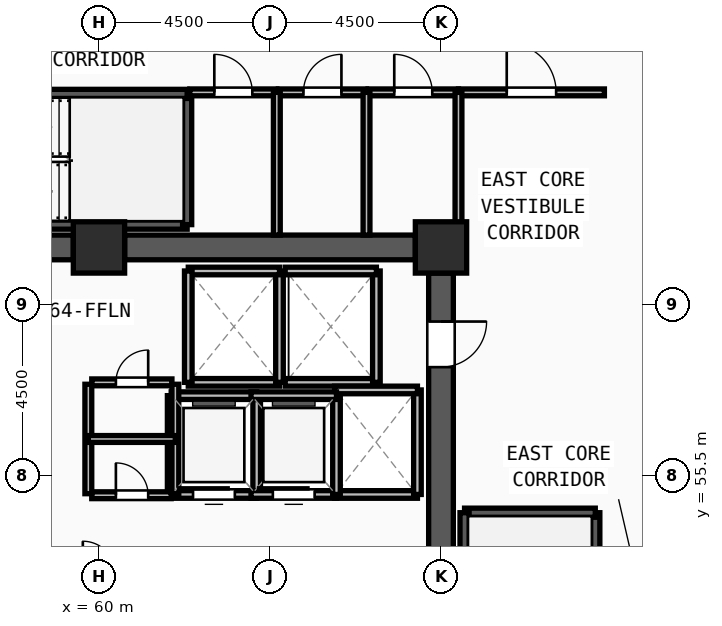
"""IFC4 building model, lengths in metres.
Left out: names, types, materials, properties, quantities, classifications, styles, units other than length and angle.
Written with IfcOpenShell. Run it as: python <this file> out.ifc"""

import sys

from ifc_helpers import new_model, si_unit, direction, frame, frame_2d, origin, origin_2d, place, context, subcontext, project, spatial, rectangle, extrude, source, transform, mapped, element, fill, save


model = new_model("IFC4")
c1 = context("Model", 3, precision=1e-05, world=origin(), true_north=direction((0.0, 1.0)))
c2 = subcontext(c1, "Body", "Model", "MODEL_VIEW")
j1 = project(units=[si_unit("LENGTHUNIT", "METRE"), si_unit("PLANEANGLEUNIT", "RADIAN")], contexts=[c1])
p1 = place(None, origin())
s1 = spatial("IfcSite", under=j1, at=p1, CompositionType="ELEMENT")
p2 = place(p1, origin())
s2 = spatial("IfcBuilding", under=s1, at=p2, CompositionType="ELEMENT")
p3 = place(p2, frame((0.0, 0.0, 247.5)))
s3 = spatial("IfcBuildingStorey", under=s2, at=p3, CompositionType="ELEMENT", Elevation=247.5)
m1 = source(origin(), c2, "Body", "SweptSolid", [
    extrude(rectangle(XDim=1.35, YDim=1.35, at=origin_2d()), origin(), (0.0, 0.0, 1.0), 3.75),
])
for number, where, z_axis, x_axis in (
    (1, (69.0, 61.5, 0.0), (0.0, 0.0, 1.0), (1.0, 0.0, 0.0)),
    (2, (60.0, 61.5, 0.0), (0.0, 0.0, 1.0), (1.0, 0.0, 0.0)),
):
    element("IfcColumn", number, at=place(p3, frame(where, z_axis=z_axis, x_axis=x_axis)), inside=s3, PredefinedType="COLUMN", context=c2, shape_type="MappedRepresentation", body=[
        mapped(m1, transform((0.0, 0.0, 0.0), x_axis=(1.0, 0.0, 0.0), y_axis=(0.0, 1.0, 0.0), z_axis=(0.0, 0.0, 1.0), scale=1.0)),
    ])
for number, where, z_axis, x_axis in (
    (3, (51.675, 61.5, 0.0), (0.0, 0.0, 1.0), (1.0, 0.0, 0.0)),
    (4, (60.675, 61.5, 0.0), (0.0, 0.0, 1.0), (1.0, 0.0, 0.0)),
):
    element("IfcWall", number, at=place(p3, frame(where, z_axis=z_axis, x_axis=x_axis)), inside=s3, PredefinedType="SHEAR", context=c2, shape_type="SweptSolid", body=[
        extrude(rectangle(XDim=7.65, YDim=0.65, at=frame_2d((3.825, 0.0))), origin(), (0.0, 0.0, 1.0), 3.57),
    ])
p4 = place(p3, frame((69.0, 60.825, 0.0), z_axis=(0.0, 0.0, 1.0), x_axis=(0.0, -1.0, 0.0)))
e5 = element("IfcWall", 5, at=p4, inside=s3, PredefinedType="SHEAR", context=c2, shape_type="SweptSolid", body=[
    extrude(rectangle(XDim=13.65, YDim=0.65, at=frame_2d((6.825, 0.0))), origin(), (0.0, 0.0, 1.0), 3.57),
])
m2 = source(origin(), c2, "Body", "SweptSolid", [
    extrude(rectangle(XDim=1.2, YDim=2.2, at=frame_2d((0.6, 1.1))), frame((0.0, 0.335, 0.0), z_axis=(0.0, -1.0, 0.0), x_axis=(1.0, 0.0, 0.0)), (0.0, 0.0, 1.0), 0.67),
])
p5 = place(p4, frame((1.275, 0.0, 0.0)))
e6 = element("IfcOpeningElement", 6, at=p5, cuts=e5, PredefinedType="OPENING", context=c2, shape_type="MappedRepresentation", body=[
    mapped(m2, transform((0.0, 0.0, 0.0), x_axis=(1.0, 0.0, 0.0), y_axis=(0.0, 1.0, 0.0), z_axis=(0.0, 0.0, 1.0), scale=1.0)),
])
p6 = place(p3, frame((73.06, 46.7, 0.0), z_axis=(0.0, 0.0, 1.0), x_axis=(0.0, 1.0, 0.0)))
e7 = element("IfcWall", 7, at=p6, inside=s3, PredefinedType="SOLIDWALL", context=c2, shape_type="SweptSolid", body=[
    extrude(rectangle(XDim=7.82, YDim=0.24, at=frame_2d((3.91, 0.0))), origin(), (0.0, 0.0, 1.0), 3.57),
])
m3 = source(origin(), c2, "Body", "SweptSolid", [
    extrude(rectangle(XDim=1.2, YDim=2.2, at=frame_2d((0.6, 1.1))), frame((0.0, 0.13, 0.0), z_axis=(0.0, -1.0, 0.0), x_axis=(1.0, 0.0, 0.0)), (0.0, 0.0, 1.0), 0.26),
])
p7 = place(p6, frame((0.32, 0.0, 0.0)))
e8 = element("IfcOpeningElement", 8, at=p7, cuts=e7, PredefinedType="OPENING", context=c2, shape_type="MappedRepresentation", body=[
    mapped(m3, transform((0.0, 0.0, 0.0), x_axis=(1.0, 0.0, 0.0), y_axis=(0.0, 1.0, 0.0), z_axis=(0.0, 0.0, 1.0), scale=1.0)),
])
p8 = place(p3, frame((73.06, 54.52, 0.0), z_axis=(0.0, 0.0, 1.0), x_axis=(-1.0, 0.0, 0.0)))
e9 = element("IfcWall", 9, at=p8, inside=s3, PredefinedType="SOLIDWALL", context=c2, shape_type="SweptSolid", body=[
    extrude(rectangle(XDim=3.44, YDim=0.24, at=frame_2d((1.72, 0.0))), origin(), (0.0, 0.0, 1.0), 3.57),
])
for number, where, z_axis, x_axis in (
    (10, (69.62, 54.52, 0.0), (0.0, 0.0, 1.0), (0.0, -1.0, 0.0)),
    (11, (54.5, 62.1, 0.0), (0.0, 0.0, 1.0), (1.0, 0.0, 0.0)),
):
    element("IfcWall", number, at=place(p3, frame(where, z_axis=z_axis, x_axis=x_axis)), inside=s3, PredefinedType="SOLIDWALL", context=c2, shape_type="SweptSolid", body=[
        extrude(rectangle(XDim=7.82, YDim=0.24, at=frame_2d((3.91, 0.0))), origin(), (0.0, 0.0, 1.0), 3.57),
    ])
p9 = place(p3, frame((62.32, 62.1, 0.0), z_axis=(0.0, 0.0, 1.0), x_axis=(0.0, 1.0, 0.0)))
e12 = element("IfcWall", 12, at=p9, inside=s3, PredefinedType="SOLIDWALL", context=c2, shape_type="SweptSolid", body=[
    extrude(rectangle(XDim=3.44, YDim=0.24, at=frame_2d((1.72, 0.0))), origin(), (0.0, 0.0, 1.0), 3.57),
])
p10 = place(p3, frame((62.32, 65.54, 0.0), z_axis=(0.0, 0.0, 1.0), x_axis=(-1.0, 0.0, 0.0)))
e13 = element("IfcWall", 13, at=p10, inside=s3, PredefinedType="SOLIDWALL", context=c2, shape_type="SweptSolid", body=[
    extrude(rectangle(XDim=7.82, YDim=0.24, at=frame_2d((3.91, 0.0))), origin(), (0.0, 0.0, 1.0), 3.57),
])
p11 = place(p10, frame((6.3, 0.0, 0.0)))
e14 = element("IfcOpeningElement", 14, at=p11, cuts=e13, PredefinedType="OPENING", context=c2, shape_type="MappedRepresentation", body=[
    mapped(m3, transform((0.0, 0.0, 0.0), x_axis=(1.0, 0.0, 0.0), y_axis=(0.0, 1.0, 0.0), z_axis=(0.0, 0.0, 1.0), scale=1.0)),
])
p12 = place(p3, frame((62.35, 57.95, 0.0), z_axis=(0.0, 0.0, 1.0), x_axis=(1.0, 0.0, 0.0)))
e15 = element("IfcWall", 15, at=p12, inside=s3, PredefinedType="SOLIDWALL", context=c2, shape_type="SweptSolid", body=[
    extrude(rectangle(XDim=2.4, YDim=0.2, at=frame_2d((1.2, 0.0))), origin(), (0.0, 0.0, 1.0), 3.57),
])
p13 = place(p3, frame((64.75, 57.95, 0.0), z_axis=(0.0, 0.0, 1.0), x_axis=(0.0, 1.0, 0.0)))
e16 = element("IfcWall", 16, at=p13, inside=s3, PredefinedType="SOLIDWALL", context=c2, shape_type="SweptSolid", body=[
    extrude(rectangle(XDim=2.93, YDim=0.2, at=frame_2d((1.465, 0.0))), origin(), (0.0, 0.0, 1.0), 3.57),
])
p14 = place(p3, frame((64.75, 60.88, 0.0), z_axis=(0.0, 0.0, 1.0), x_axis=(-1.0, 0.0, 0.0)))
e17 = element("IfcWall", 17, at=p14, inside=s3, PredefinedType="SOLIDWALL", context=c2, shape_type="SweptSolid", body=[
    extrude(rectangle(XDim=2.4, YDim=0.2, at=frame_2d((1.2, 0.0))), origin(), (0.0, 0.0, 1.0), 3.57),
])
p15 = place(p3, frame((62.35, 60.88, 0.0), z_axis=(0.0, 0.0, 1.0), x_axis=(0.0, -1.0, 0.0)))
e18 = element("IfcWall", 18, at=p15, inside=s3, PredefinedType="SOLIDWALL", context=c2, shape_type="SweptSolid", body=[
    extrude(rectangle(XDim=2.93, YDim=0.2, at=frame_2d((1.465, 0.0))), origin(), (0.0, 0.0, 1.0), 3.57),
])
p16 = place(p3, frame((64.9, 57.95, 0.0), z_axis=(0.0, 0.0, 1.0), x_axis=(1.0, 0.0, 0.0)))
e19 = element("IfcWall", 19, at=p16, inside=s3, PredefinedType="SOLIDWALL", context=c2, shape_type="SweptSolid", body=[
    extrude(rectangle(XDim=2.4, YDim=0.2, at=frame_2d((1.2, 0.0))), origin(), (0.0, 0.0, 1.0), 3.57),
])
p17 = place(p3, frame((67.3, 57.95, 0.0), z_axis=(0.0, 0.0, 1.0), x_axis=(0.0, 1.0, 0.0)))
e20 = element("IfcWall", 20, at=p17, inside=s3, PredefinedType="SOLIDWALL", context=c2, shape_type="SweptSolid", body=[
    extrude(rectangle(XDim=2.93, YDim=0.2, at=frame_2d((1.465, 0.0))), origin(), (0.0, 0.0, 1.0), 3.57),
])
p18 = place(p3, frame((67.3, 60.88, 0.0), z_axis=(0.0, 0.0, 1.0), x_axis=(-1.0, 0.0, 0.0)))
e21 = element("IfcWall", 21, at=p18, inside=s3, PredefinedType="SOLIDWALL", context=c2, shape_type="SweptSolid", body=[
    extrude(rectangle(XDim=2.4, YDim=0.2, at=frame_2d((1.2, 0.0))), origin(), (0.0, 0.0, 1.0), 3.57),
])
p19 = place(p3, frame((66.2, 55.0, 0.0), z_axis=(0.0, 0.0, 1.0), x_axis=(1.0, 0.0, 0.0)))
e22 = element("IfcWall", 22, at=p19, inside=s3, PredefinedType="SOLIDWALL", context=c2, shape_type="SweptSolid", body=[
    extrude(rectangle(XDim=2.18, YDim=0.2, at=frame_2d((1.09, 0.0))), origin(), (0.0, 0.0, 1.0), 3.57),
])
p20 = place(p3, frame((68.38, 55.0, 0.0), z_axis=(0.0, 0.0, 1.0), x_axis=(0.0, 1.0, 0.0)))
e23 = element("IfcWall", 23, at=p20, inside=s3, PredefinedType="SOLIDWALL", context=c2, shape_type="SweptSolid", body=[
    extrude(rectangle(XDim=2.75, YDim=0.2, at=frame_2d((1.375, 0.0))), origin(), (0.0, 0.0, 1.0), 3.57),
])
p21 = place(p3, frame((68.38, 57.75, 0.0), z_axis=(0.0, 0.0, 1.0), x_axis=(-1.0, 0.0, 0.0)))
e24 = element("IfcWall", 24, at=p21, inside=s3, PredefinedType="SOLIDWALL", context=c2, shape_type="SweptSolid", body=[
    extrude(rectangle(XDim=2.18, YDim=0.2, at=frame_2d((1.09, 0.0))), origin(), (0.0, 0.0, 1.0), 3.57),
])
p22 = place(p3, frame((61.9, 55.0, 0.0), z_axis=(0.0, 0.0, 1.0), x_axis=(1.0, 0.0, 0.0)))
e25 = element("IfcWall", 25, at=p22, inside=s3, PredefinedType="SOLIDWALL", context=c2, shape_type="SweptSolid", body=[
    extrude(rectangle(XDim=2.25, YDim=0.2, at=frame_2d((1.125, 0.0))), origin(), (0.0, 0.0, 1.0), 3.57),
])
m4 = source(origin(), c2, "Body", "SweptSolid", [
    extrude(rectangle(XDim=1.1, YDim=2.2, at=frame_2d((0.55, 1.1))), frame((0.0, 0.11, 0.0), z_axis=(0.0, -1.0, 0.0), x_axis=(1.0, 0.0, 0.0)), (0.0, 0.0, 1.0), 0.22),
])
p23 = place(p22, frame((0.575, 0.0, 0.0)))
e26 = element("IfcOpeningElement", 26, at=p23, cuts=e25, PredefinedType="OPENING", context=c2, shape_type="MappedRepresentation", body=[
    mapped(m4, transform((0.0, 0.0, 0.0), x_axis=(1.0, 0.0, 0.0), y_axis=(0.0, 1.0, 0.0), z_axis=(0.0, 0.0, 1.0), scale=1.0)),
])
p24 = place(p3, frame((64.15, 55.0, 0.0), z_axis=(0.0, 0.0, 1.0), x_axis=(0.0, 1.0, 0.0)))
e27 = element("IfcWall", 27, at=p24, inside=s3, PredefinedType="SOLIDWALL", context=c2, shape_type="SweptSolid", body=[
    extrude(rectangle(XDim=2.6, YDim=0.2, at=frame_2d((1.3, 0.0))), origin(), (0.0, 0.0, 1.0), 3.57),
])
p25 = place(p3, frame((64.15, 57.6, 0.0), z_axis=(0.0, 0.0, 1.0), x_axis=(-1.0, 0.0, 0.0)))
e28 = element("IfcWall", 28, at=p25, inside=s3, PredefinedType="SOLIDWALL", context=c2, shape_type="SweptSolid", body=[
    extrude(rectangle(XDim=2.25, YDim=0.2, at=frame_2d((1.125, 0.0))), origin(), (0.0, 0.0, 1.0), 3.57),
])
p26 = place(p3, frame((61.9, 57.6, 0.0), z_axis=(0.0, 0.0, 1.0), x_axis=(0.0, -1.0, 0.0)))
e29 = element("IfcWall", 29, at=p26, inside=s3, PredefinedType="SOLIDWALL", context=c2, shape_type="SweptSolid", body=[
    extrude(rectangle(XDim=2.6, YDim=0.2, at=frame_2d((1.3, 0.0))), origin(), (0.0, 0.0, 1.0), 3.57),
])
p27 = place(p3, frame((64.0, 55.0, 0.0), z_axis=(0.0, 0.0, 1.0), x_axis=(1.0, 0.0, 0.0)))
e30 = element("IfcWall", 30, at=p27, inside=s3, PredefinedType="SOLIDWALL", context=c2, shape_type="SweptSolid", body=[
    extrude(rectangle(XDim=2.25, YDim=0.2, at=frame_2d((1.125, 0.0))), origin(), (0.0, 0.0, 1.0), 3.57),
])
p28 = place(p27, frame((0.575, 0.0, 0.0)))
e31 = element("IfcOpeningElement", 31, at=p28, cuts=e30, PredefinedType="OPENING", context=c2, shape_type="MappedRepresentation", body=[
    mapped(m4, transform((0.0, 0.0, 0.0), x_axis=(1.0, 0.0, 0.0), y_axis=(0.0, 1.0, 0.0), z_axis=(0.0, 0.0, 1.0), scale=1.0)),
])
p29 = place(p3, frame((66.25, 55.0, 0.0), z_axis=(0.0, 0.0, 1.0), x_axis=(0.0, 1.0, 0.0)))
e32 = element("IfcWall", 32, at=p29, inside=s3, PredefinedType="SOLIDWALL", context=c2, shape_type="SweptSolid", body=[
    extrude(rectangle(XDim=2.6, YDim=0.2, at=frame_2d((1.3, 0.0))), origin(), (0.0, 0.0, 1.0), 3.57),
])
p30 = place(p3, frame((66.25, 57.6, 0.0), z_axis=(0.0, 0.0, 1.0), x_axis=(-1.0, 0.0, 0.0)))
e33 = element("IfcWall", 33, at=p30, inside=s3, PredefinedType="SOLIDWALL", context=c2, shape_type="SweptSolid", body=[
    extrude(rectangle(XDim=2.25, YDim=0.2, at=frame_2d((1.125, 0.0))), origin(), (0.0, 0.0, 1.0), 3.57),
])
p31 = place(p3, frame((59.81, 54.98, 0.0), z_axis=(0.0, 0.0, 1.0), x_axis=(1.0, 0.0, 0.0)))
e34 = element("IfcWall", 34, at=p31, inside=s3, PredefinedType="PARTITIONING", context=c2, shape_type="SweptSolid", body=[
    extrude(rectangle(XDim=2.09, YDim=0.18, at=frame_2d((1.045, 0.0))), origin(), (0.0, 0.0, 1.0), 3.57),
])
m5 = source(origin(), c2, "Body", "SweptSolid", [
    extrude(rectangle(XDim=0.85, YDim=2.1, at=frame_2d((0.425, 1.05))), frame((0.0, 0.1, 0.0), z_axis=(0.0, -1.0, 0.0), x_axis=(1.0, 0.0, 0.0)), (0.0, 0.0, 1.0), 0.2),
])
p32 = place(p31, frame((0.635, 0.0, 0.0)))
e35 = element("IfcOpeningElement", 35, at=p32, cuts=e34, PredefinedType="OPENING", context=c2, shape_type="MappedRepresentation", body=[
    mapped(m5, transform((0.0, 0.0, 0.0), x_axis=(1.0, 0.0, 0.0), y_axis=(0.0, 1.0, 0.0), z_axis=(0.0, 0.0, 1.0), scale=1.0)),
])
p33 = place(p3, frame((59.81, 57.95, 0.0), z_axis=(0.0, 0.0, 1.0), x_axis=(1.0, 0.0, 0.0)))
e36 = element("IfcWall", 36, at=p33, inside=s3, PredefinedType="PARTITIONING", context=c2, shape_type="SweptSolid", body=[
    extrude(rectangle(XDim=2.11, YDim=0.18, at=frame_2d((1.055, 0.0))), origin(), (0.0, 0.0, 1.0), 3.57),
])
p34 = place(p33, frame((0.635, 0.0, 0.0)))
e37 = element("IfcOpeningElement", 37, at=p34, cuts=e36, PredefinedType="OPENING", context=c2, shape_type="MappedRepresentation", body=[
    mapped(m5, transform((0.0, 0.0, 0.0), x_axis=(1.0, 0.0, 0.0), y_axis=(0.0, 1.0, 0.0), z_axis=(0.0, 0.0, 1.0), scale=1.0)),
])
p35 = place(p3, frame((62.39, 65.58, 0.0), z_axis=(0.0, 0.0, 1.0), x_axis=(1.0, 0.0, 0.0)))
e38 = element("IfcWall", 38, at=p35, inside=s3, PredefinedType="PARTITIONING", context=c2, shape_type="SweptSolid", body=[
    extrude(rectangle(XDim=2.29, YDim=0.18, at=frame_2d((1.145, 0.0))), origin(), (0.0, 0.0, 1.0), 3.57),
])
m6 = source(origin(), c2, "Body", "SweptSolid", [
    extrude(rectangle(XDim=1.0, YDim=2.2, at=frame_2d((0.5, 1.1))), frame((0.0, 0.1, 0.0), z_axis=(0.0, -1.0, 0.0), x_axis=(1.0, 0.0, 0.0)), (0.0, 0.0, 1.0), 0.2),
])
p36 = place(p35, frame((0.645, 0.0, 0.0)))
e39 = element("IfcOpeningElement", 39, at=p36, cuts=e38, PredefinedType="OPENING", context=c2, shape_type="MappedRepresentation", body=[
    mapped(m6, transform((0.0, 0.0, 0.0), x_axis=(1.0, 0.0, 0.0), y_axis=(0.0, 1.0, 0.0), z_axis=(0.0, 0.0, 1.0), scale=1.0)),
])
p37 = place(p3, frame((64.72, 65.58, 0.0), z_axis=(0.0, 0.0, 1.0), x_axis=(1.0, 0.0, 0.0)))
e40 = element("IfcWall", 40, at=p37, inside=s3, PredefinedType="PARTITIONING", context=c2, shape_type="SweptSolid", body=[
    extrude(rectangle(XDim=2.32, YDim=0.18, at=frame_2d((1.16, 0.0))), origin(), (0.0, 0.0, 1.0), 3.57),
])
p38 = place(p37, frame((0.66, 0.0, 0.0)))
e41 = element("IfcOpeningElement", 41, at=p38, cuts=e40, PredefinedType="OPENING", context=c2, shape_type="MappedRepresentation", body=[
    mapped(m6, transform((0.0, 0.0, 0.0), x_axis=(1.0, 0.0, 0.0), y_axis=(0.0, 1.0, 0.0), z_axis=(0.0, 0.0, 1.0), scale=1.0)),
])
p39 = place(p3, frame((67.08, 65.58, 0.0), z_axis=(0.0, 0.0, 1.0), x_axis=(1.0, 0.0, 0.0)))
e42 = element("IfcWall", 42, at=p39, inside=s3, PredefinedType="PARTITIONING", context=c2, shape_type="SweptSolid", body=[
    extrude(rectangle(XDim=2.38, YDim=0.18, at=frame_2d((1.19, 0.0))), origin(), (0.0, 0.0, 1.0), 3.57),
])
p40 = place(p39, frame((0.69, 0.0, 0.0)))
e43 = element("IfcOpeningElement", 43, at=p40, cuts=e42, PredefinedType="OPENING", context=c2, shape_type="MappedRepresentation", body=[
    mapped(m6, transform((0.0, 0.0, 0.0), x_axis=(1.0, 0.0, 0.0), y_axis=(0.0, 1.0, 0.0), z_axis=(0.0, 0.0, 1.0), scale=1.0)),
])
p41 = place(p3, frame((69.46, 65.58, 0.0), z_axis=(0.0, 0.0, 1.0), x_axis=(1.0, 0.0, 0.0)))
e44 = element("IfcWall", 44, at=p41, inside=s3, PredefinedType="PARTITIONING", context=c2, shape_type="SweptSolid", body=[
    extrude(rectangle(XDim=3.84, YDim=0.18, at=frame_2d((1.92, 0.0))), origin(), (0.0, 0.0, 1.0), 3.57),
])
m7 = source(origin(), c2, "Body", "SweptSolid", [
    extrude(rectangle(XDim=1.3, YDim=2.2, at=frame_2d((0.65, 1.1))), frame((0.0, 0.1, 0.0), z_axis=(0.0, -1.0, 0.0), x_axis=(1.0, 0.0, 0.0)), (0.0, 0.0, 1.0), 0.2),
])
p42 = place(p41, frame((1.27, 0.0, 0.0)))
e45 = element("IfcOpeningElement", 45, at=p42, cuts=e44, PredefinedType="OPENING", context=c2, shape_type="MappedRepresentation", body=[
    mapped(m7, transform((0.0, 0.0, 0.0), x_axis=(1.0, 0.0, 0.0), y_axis=(0.0, 1.0, 0.0), z_axis=(0.0, 0.0, 1.0), scale=1.0)),
])
for number, where, z_axis, x_axis in (
    (46, (59.72, 55.02, 0.0), (0.0, 0.0, 1.0), (0.0, 1.0, 0.0)),
    (47, (62.01, 55.02, 0.0), (0.0, 0.0, 1.0), (0.0, 1.0, 0.0)),
):
    element("IfcWall", number, at=place(p3, frame(where, z_axis=z_axis, x_axis=x_axis)), inside=s3, PredefinedType="PARTITIONING", context=c2, shape_type="SweptSolid", body=[
        extrude(rectangle(XDim=2.88, YDim=0.18, at=frame_2d((1.44, 0.0))), origin(), (0.0, 0.0, 1.0), 3.57),
    ])
p43 = place(p3, frame((59.72, 56.46, 0.0), z_axis=(0.0, 0.0, 1.0), x_axis=(1.0, 0.0, 0.0)))
e48 = element("IfcWall", 48, at=p43, inside=s3, PredefinedType="PARTITIONING", context=c2, shape_type="SweptSolid", body=[
    extrude(rectangle(XDim=2.29, YDim=0.18, at=frame_2d((1.145, 0.0))), origin(), (0.0, 0.0, 1.0), 3.57),
])
for number, where, z_axis, x_axis in (
    (49, (64.68, 61.825, 0.0), (0.0, 0.0, 1.0), (0.0, 1.0, 0.0)),
    (50, (67.04, 61.825, 0.0), (0.0, 0.0, 1.0), (0.0, 1.0, 0.0)),
):
    element("IfcWall", number, at=place(p3, frame(where, z_axis=z_axis, x_axis=x_axis)), inside=s3, PredefinedType="PARTITIONING", context=c2, shape_type="SweptSolid", body=[
        extrude(rectangle(XDim=3.755, YDim=0.18, at=frame_2d((1.877, 0.0))), origin(), (0.0, 0.0, 1.0), 3.57),
    ])
p44 = place(p3, frame((69.46, 61.95, 0.0), z_axis=(0.0, 0.0, 1.0), x_axis=(0.0, 1.0, 0.0)))
e51 = element("IfcWall", 51, at=p44, inside=s3, PredefinedType="PARTITIONING", context=c2, shape_type="SweptSolid", body=[
    extrude(rectangle(XDim=3.63, YDim=0.18, at=frame_2d((1.815, 0.0))), origin(), (0.0, 0.0, 1.0), 3.57),
])
m8 = source(origin(), c2, "Body", "SweptSolid", [
    extrude(rectangle(XDim=1.2, YDim=2.2, at=frame_2d((0.6, 1.1))), frame((0.0, 0.025, 0.0), z_axis=(0.0, -1.0, 0.0), x_axis=(1.0, 0.0, 0.0)), (0.0, 0.0, 1.0), 0.05),
])
p45 = place(p5, origin())
e52 = element("IfcDoor", 52, at=p45, inside=s3, OperationType="SINGLE_SWING_LEFT", PredefinedType="DOOR", context=c2, shape_type="MappedRepresentation", body=[
    mapped(m8, transform((0.0, 0.0, 0.0), x_axis=(1.0, 0.0, 0.0), y_axis=(0.0, 1.0, 0.0), z_axis=(0.0, 0.0, 1.0), scale=1.0)),
])
fill(e6, e52)
m9 = source(origin(), c2, "Body", "SweptSolid", [
    extrude(rectangle(XDim=1.1, YDim=2.2, at=frame_2d((0.55, 1.1))), frame((0.0, 0.025, 0.0), z_axis=(0.0, -1.0, 0.0), x_axis=(1.0, 0.0, 0.0)), (0.0, 0.0, 1.0), 0.05),
])
p46 = place(p23, origin())
e53 = element("IfcDoor", 53, at=p46, inside=s3, OperationType="SLIDING_TO_LEFT", PredefinedType="DOOR", context=c2, shape_type="MappedRepresentation", body=[
    mapped(m9, transform((0.0, 0.0, 0.0), x_axis=(1.0, 0.0, 0.0), y_axis=(0.0, 1.0, 0.0), z_axis=(0.0, 0.0, 1.0), scale=1.0)),
])
fill(e26, e53)
p47 = place(p28, origin())
e54 = element("IfcDoor", 54, at=p47, inside=s3, OperationType="SLIDING_TO_LEFT", PredefinedType="DOOR", context=c2, shape_type="MappedRepresentation", body=[
    mapped(m9, transform((0.0, 0.0, 0.0), x_axis=(1.0, 0.0, 0.0), y_axis=(0.0, 1.0, 0.0), z_axis=(0.0, 0.0, 1.0), scale=1.0)),
])
fill(e31, e54)
m10 = source(origin(), c2, "Body", "SweptSolid", [
    extrude(rectangle(XDim=0.85, YDim=2.1, at=frame_2d((0.425, 1.05))), frame((0.0, 0.025, 0.0), z_axis=(0.0, -1.0, 0.0), x_axis=(1.0, 0.0, 0.0)), (0.0, 0.0, 1.0), 0.05),
])
p48 = place(p32, origin())
e55 = element("IfcDoor", 55, at=p48, inside=s3, OperationType="SINGLE_SWING_LEFT", PredefinedType="DOOR", context=c2, shape_type="MappedRepresentation", body=[
    mapped(m10, transform((0.0, 0.0, 0.0), x_axis=(1.0, 0.0, 0.0), y_axis=(0.0, 1.0, 0.0), z_axis=(0.0, 0.0, 1.0), scale=1.0)),
])
fill(e35, e55)
p49 = place(p34, origin())
e56 = element("IfcDoor", 56, at=p49, inside=s3, OperationType="SINGLE_SWING_RIGHT", PredefinedType="DOOR", context=c2, shape_type="MappedRepresentation", body=[
    mapped(m10, transform((0.0, 0.0, 0.0), x_axis=(1.0, 0.0, 0.0), y_axis=(0.0, 1.0, 0.0), z_axis=(0.0, 0.0, 1.0), scale=1.0)),
])
fill(e37, e56)
m11 = source(origin(), c2, "Body", "SweptSolid", [
    extrude(rectangle(XDim=1.0, YDim=2.2, at=frame_2d((0.5, 1.1))), frame((0.0, 0.025, 0.0), z_axis=(0.0, -1.0, 0.0), x_axis=(1.0, 0.0, 0.0)), (0.0, 0.0, 1.0), 0.05),
])
p50 = place(p36, origin())
e57 = element("IfcDoor", 57, at=p50, inside=s3, OperationType="SINGLE_SWING_LEFT", PredefinedType="DOOR", context=c2, shape_type="MappedRepresentation", body=[
    mapped(m11, transform((0.0, 0.0, 0.0), x_axis=(1.0, 0.0, 0.0), y_axis=(0.0, 1.0, 0.0), z_axis=(0.0, 0.0, 1.0), scale=1.0)),
])
fill(e39, e57)
p51 = place(p38, origin())
e58 = element("IfcDoor", 58, at=p51, inside=s3, OperationType="SINGLE_SWING_RIGHT", PredefinedType="DOOR", context=c2, shape_type="MappedRepresentation", body=[
    mapped(m11, transform((0.0, 0.0, 0.0), x_axis=(1.0, 0.0, 0.0), y_axis=(0.0, 1.0, 0.0), z_axis=(0.0, 0.0, 1.0), scale=1.0)),
])
fill(e41, e58)
p52 = place(p40, origin())
e59 = element("IfcDoor", 59, at=p52, inside=s3, OperationType="SINGLE_SWING_LEFT", PredefinedType="DOOR", context=c2, shape_type="MappedRepresentation", body=[
    mapped(m11, transform((0.0, 0.0, 0.0), x_axis=(1.0, 0.0, 0.0), y_axis=(0.0, 1.0, 0.0), z_axis=(0.0, 0.0, 1.0), scale=1.0)),
])
fill(e43, e59)
m12 = source(origin(), c2, "Body", "SweptSolid", [
    extrude(rectangle(XDim=1.3, YDim=2.2, at=frame_2d((0.65, 1.1))), frame((0.0, 0.025, 0.0), z_axis=(0.0, -1.0, 0.0), x_axis=(1.0, 0.0, 0.0)), (0.0, 0.0, 1.0), 0.05),
])
p53 = place(p42, origin())
e60 = element("IfcDoor", 60, at=p53, inside=s3, OperationType="SINGLE_SWING_LEFT", PredefinedType="DOOR", context=c2, shape_type="MappedRepresentation", body=[
    mapped(m12, transform((0.0, 0.0, 0.0), x_axis=(1.0, 0.0, 0.0), y_axis=(0.0, 1.0, 0.0), z_axis=(0.0, 0.0, 1.0), scale=1.0)),
])
fill(e45, e60)
save(model, sys.argv[1])
